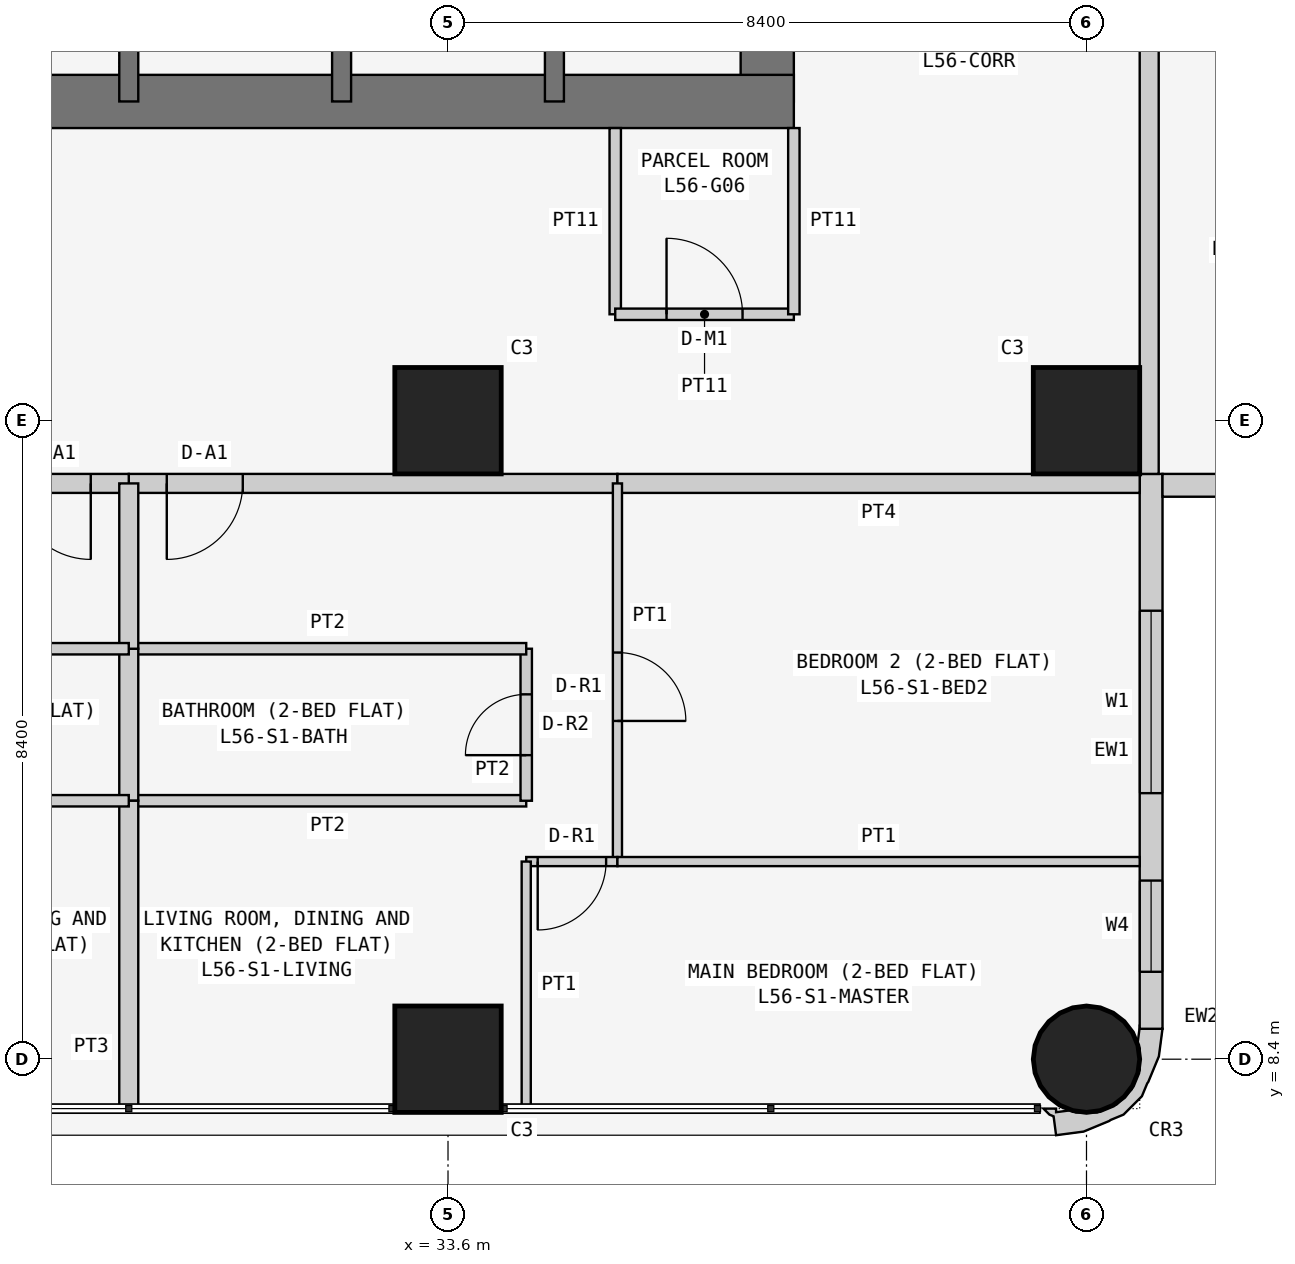
"""IFC4 building model, lengths in metres.
Left out: names, types, materials, properties, quantities, classifications, styles, units other than length and angle.
Written with IfcOpenShell. Run it as: python <this file> out.ifc"""

import sys

from ifc_helpers import new_model, si_unit, direction, frame, frame_2d, origin, origin_2d, place, context, subcontext, project, spatial, polyline, rectangle, circle, outline, extrude, element, fill, save


model = new_model("IFC4")
c1 = context("Model", 3, precision=1e-05, world=origin(), true_north=direction((0.0, 1.0)))
c2 = subcontext(c1, "Body", "Model", "MODEL_VIEW")
j1 = project(units=[si_unit("LENGTHUNIT", "METRE"), si_unit("PLANEANGLEUNIT", "RADIAN")], contexts=[c1])
p1 = place(None, origin())
s1 = spatial("IfcSite", under=j1, at=p1, CompositionType="ELEMENT")
p2 = place(p1, origin())
s2 = spatial("IfcBuilding", under=s1, at=p2, CompositionType="ELEMENT")
p3 = place(p2, frame((0.0, 0.0, 215.7)))
s3 = spatial("IfcBuildingStorey", under=s2, at=p3, CompositionType="ELEMENT", Elevation=215.7)
for number, where, z_axis, x_axis in (
    (1, (33.6, 8.4, 0.0), (0.0, 0.0, 1.0), (1.0, 0.0, 0.0)),
    (2, (33.6, 16.8, 0.0), (0.0, 0.0, 1.0), (1.0, 0.0, 0.0)),
):
    element("IfcColumn", number, at=place(p3, frame(where, z_axis=z_axis, x_axis=x_axis)), inside=s3, PredefinedType="COLUMN", context=c2, shape_type="SweptSolid", body=[
        extrude(rectangle(XDim=1.4, YDim=1.4, at=origin_2d()), origin(), (0.0, 0.0, 1.0), 3.6),
    ])
p4 = place(p3, frame((42.0, 8.4, 0.0), z_axis=(0.0, 0.0, 1.0), x_axis=(1.0, 0.0, 0.0)))
e3 = element("IfcColumn", 3, at=p4, inside=s3, PredefinedType="COLUMN", context=c2, shape_type="SweptSolid", body=[
    extrude(circle(Radius=0.7, at=origin_2d()), origin(), (0.0, 0.0, 1.0), 3.6),
])
p5 = place(p3, frame((42.0, 16.8, 0.0), z_axis=(0.0, 0.0, 1.0), x_axis=(1.0, 0.0, 0.0)))
e4 = element("IfcColumn", 4, at=p5, inside=s3, PredefinedType="COLUMN", context=c2, shape_type="SweptSolid", body=[
    extrude(rectangle(XDim=1.4, YDim=1.4, at=origin_2d()), origin(), (0.0, 0.0, 1.0), 3.6),
])
p6 = place(p3, frame((21.0, 21.0, 0.0), z_axis=(0.0, 0.0, 1.0), x_axis=(1.0, 0.0, 0.0)))
e5 = element("IfcWall", 5, at=p6, inside=s3, PredefinedType="SHEAR", context=c2, shape_type="SweptSolid", body=[
    extrude(rectangle(XDim=17.15, YDim=0.7, at=frame_2d((8.575, 0.0))), origin(), (0.0, 0.0, 1.0), 3.6),
])
p7 = place(p3, frame((37.8, 21.0, 0.0), z_axis=(0.0, 0.0, 1.0), x_axis=(0.0, 1.0, 0.0)))
e6 = element("IfcWall", 6, at=p7, inside=s3, PredefinedType="SHEAR", context=c2, shape_type="SweptSolid", body=[
    extrude(rectangle(XDim=17.15, YDim=0.7, at=frame_2d((8.575, 0.0))), origin(), (0.0, 0.0, 1.0), 3.6),
])
p8 = place(p7, frame((5.2, 0.0, 0.0)))
e7 = element("IfcOpeningElement", 7, at=p8, cuts=e6, PredefinedType="OPENING", context=c2, shape_type="SweptSolid", body=[
    extrude(rectangle(XDim=1.2, YDim=2.1, at=frame_2d((0.6, 1.05))), frame((0.0, 0.36, 0.0), z_axis=(0.0, -1.0, 0.0), x_axis=(1.0, 0.0, 0.0)), (0.0, 0.0, 1.0), 0.72),
])
for number, where, z_axis, x_axis in (
    (8, (29.4, 21.0, 0.0), (0.0, 0.0, 1.0), (0.0, 1.0, 0.0)),
    (9, (32.2, 21.0, 0.0), (0.0, 0.0, 1.0), (0.0, 1.0, 0.0)),
    (10, (35.0, 21.0, 0.0), (0.0, 0.0, 1.0), (0.0, 1.0, 0.0)),
):
    element("IfcWall", number, at=place(p3, frame(where, z_axis=z_axis, x_axis=x_axis)), inside=s3, PredefinedType="SHEAR", context=c2, shape_type="SweptSolid", body=[
        extrude(rectangle(XDim=3.2, YDim=0.25, at=frame_2d((1.6, 0.0))), origin(), (0.0, 0.0, 1.0), 3.6),
    ])
p9 = place(p3, frame((42.85, 8.8, 0.0), z_axis=(0.0, 0.0, 1.0), x_axis=(0.0, 1.0, 0.0)))
e11 = element("IfcWall", 11, at=p9, inside=s3, PredefinedType="SOLIDWALL", context=c2, shape_type="SweptSolid", body=[
    extrude(rectangle(XDim=7.3, YDim=0.3, at=frame_2d((3.65, 0.0))), origin(), (0.0, 0.0, 1.0), 3.45),
])
p10 = place(p9, frame((3.1, 0.0, 0.9)))
e12 = element("IfcOpeningElement", 12, at=p10, cuts=e11, PredefinedType="OPENING", context=c2, shape_type="SweptSolid", body=[
    extrude(rectangle(XDim=2.4, YDim=1.5, at=frame_2d((1.2, 0.75))), frame((0.0, 0.16, 0.0), z_axis=(0.0, -1.0, 0.0), x_axis=(1.0, 0.0, 0.0)), (0.0, 0.0, 1.0), 0.32),
])
p11 = place(p9, frame((0.75, 0.0, 0.9)))
e13 = element("IfcOpeningElement", 13, at=p11, cuts=e11, PredefinedType="OPENING", context=c2, shape_type="SweptSolid", body=[
    extrude(rectangle(XDim=1.2, YDim=1.5, at=frame_2d((0.6, 0.75))), frame((0.0, 0.16, 0.0), z_axis=(0.0, -1.0, 0.0), x_axis=(1.0, 0.0, 0.0)), (0.0, 0.0, 1.0), 0.32),
])
p12 = place(p3, frame((43.0, 15.95, 0.0), z_axis=(0.0, 0.0, 1.0), x_axis=(1.0, 0.0, 0.0)))
e14 = element("IfcWall", 14, at=p12, inside=s3, PredefinedType="SOLIDWALL", context=c2, shape_type="SweptSolid", body=[
    extrude(rectangle(XDim=7.0, YDim=0.3, at=frame_2d((3.5, 0.0))), origin(), (0.0, 0.0, 1.0), 3.45),
])
p13 = place(p12, frame((1.5, 0.0, 0.9)))
e15 = element("IfcOpeningElement", 15, at=p13, cuts=e14, PredefinedType="OPENING", context=c2, shape_type="SweptSolid", body=[
    extrude(rectangle(XDim=2.4, YDim=1.5, at=frame_2d((1.2, 0.75))), frame((0.0, 0.16, 0.0), z_axis=(0.0, -1.0, 0.0), x_axis=(1.0, 0.0, 0.0)), (0.0, 0.0, 1.0), 0.32),
])
p14 = place(p12, frame((5.05, 0.0, 0.9)))
e16 = element("IfcOpeningElement", 16, at=p14, cuts=e14, PredefinedType="OPENING", context=c2, shape_type="SweptSolid", body=[
    extrude(rectangle(XDim=1.2, YDim=1.5, at=frame_2d((0.6, 0.75))), frame((0.0, 0.16, 0.0), z_axis=(0.0, -1.0, 0.0), x_axis=(1.0, 0.0, 0.0)), (0.0, 0.0, 1.0), 0.32),
])
p15 = place(p3, frame((41.488, 7.812, 0.0), z_axis=(0.0, 0.0, 1.0), x_axis=(0.439933741929, -0.898030234854, 0.0)))
e17 = element("IfcWall", 17, at=p15, inside=s3, PredefinedType="SOLIDWALL", context=c2, shape_type="SweptSolid", body=[
    extrude(outline(polyline([(-0.222, 1.793), (-0.39, 1.541), (-0.372, 1.532), (-0.195, 1.414), (-0.12, 1.41), (0.131, 1.287), (0.315, 1.078), (0.406, 0.814), (0.388, 0.536), (0.265, 0.285), (0.209, 0.235), (0.148, 0.053), (0.105, 0.074), (0.032, -0.076), (0.138, -0.04), (0.182, -0.0), (0.419, -0.08), (0.536, 0.266), (0.559, 0.631), (0.555, 0.651), (0.566, 0.836), (0.455, 1.159), (0.333, 1.298), (0.324, 1.317), (0.082, 1.591), (-0.222, 1.793)])), origin(), (0.0, 0.0, 1.0), 3.45),
])
p16 = place(p3, frame((35.8, 20.65, 0.0), z_axis=(0.0, 0.0, 1.0), x_axis=(0.0, -1.0, 0.0)))
e18 = element("IfcWall", 18, at=p16, inside=s3, PredefinedType="PARTITIONING", context=c2, shape_type="SweptSolid", body=[
    extrude(rectangle(XDim=2.45, YDim=0.15, at=frame_2d((1.225, 0.0))), origin(), (0.0, 0.0, 1.0), 3.45),
])
p17 = place(p3, frame((35.8, 18.2, 0.0), z_axis=(0.0, 0.0, 1.0), x_axis=(1.0, 0.0, 0.0)))
e19 = element("IfcWall", 19, at=p17, inside=s3, PredefinedType="PARTITIONING", context=c2, shape_type="SweptSolid", body=[
    extrude(rectangle(XDim=2.35, YDim=0.15, at=frame_2d((1.175, 0.0))), origin(), (0.0, 0.0, 1.0), 3.45),
])
p18 = place(p17, frame((0.675, 0.0, 0.0)))
e20 = element("IfcOpeningElement", 20, at=p18, cuts=e19, PredefinedType="OPENING", context=c2, shape_type="SweptSolid", body=[
    extrude(rectangle(XDim=1.0, YDim=2.1, at=frame_2d((0.5, 1.05))), frame((0.0, 0.085, 0.0), z_axis=(0.0, -1.0, 0.0), x_axis=(1.0, 0.0, 0.0)), (0.0, 0.0, 1.0), 0.17),
])
p19 = place(p3, frame((38.15, 18.2, 0.0), z_axis=(0.0, 0.0, 1.0), x_axis=(0.0, 1.0, 0.0)))
e21 = element("IfcWall", 21, at=p19, inside=s3, PredefinedType="PARTITIONING", context=c2, shape_type="SweptSolid", body=[
    extrude(rectangle(XDim=2.45, YDim=0.15, at=frame_2d((1.225, 0.0))), origin(), (0.0, 0.0, 1.0), 3.45),
])
p20 = place(p3, frame((42.825, 22.971, 0.0), z_axis=(0.0, 0.0, 1.0), x_axis=(0.0, -1.0, 0.0)))
e22 = element("IfcWall", 22, at=p20, inside=s3, PredefinedType="PARTITIONING", context=c2, shape_type="SweptSolid", body=[
    extrude(rectangle(XDim=6.871, YDim=0.25, at=frame_2d((3.436, 0.0))), origin(), (0.0, 0.0, 1.0), 3.45),
])
p21 = place(p3, frame((35.829, 15.975, 0.0), z_axis=(0.0, 0.0, 1.0), x_axis=(-1.0, 0.0, 0.0)))
e23 = element("IfcWall", 23, at=p21, inside=s3, PredefinedType="PARTITIONING", context=c2, shape_type="SweptSolid", body=[
    extrude(rectangle(XDim=6.429, YDim=0.25, at=frame_2d((3.215, 0.0))), origin(), (0.0, 0.0, 1.0), 3.45),
])
p22 = place(p21, frame((4.929, 0.0, 0.0)))
e24 = element("IfcOpeningElement", 24, at=p22, cuts=e23, PredefinedType="OPENING", context=c2, shape_type="SweptSolid", body=[
    extrude(rectangle(XDim=1.0, YDim=2.1, at=frame_2d((0.5, 1.05))), frame((0.0, 0.135, 0.0), z_axis=(0.0, -1.0, 0.0), x_axis=(1.0, 0.0, 0.0)), (0.0, 0.0, 1.0), 0.27),
])
p23 = place(p3, frame((42.7, 15.975, 0.0), z_axis=(0.0, 0.0, 1.0), x_axis=(-1.0, 0.0, 0.0)))
e25 = element("IfcWall", 25, at=p23, inside=s3, PredefinedType="PARTITIONING", context=c2, shape_type="SweptSolid", body=[
    extrude(rectangle(XDim=6.871, YDim=0.25, at=frame_2d((3.436, 0.0))), origin(), (0.0, 0.0, 1.0), 3.45),
])
p24 = place(p3, frame((29.4, 15.975, 0.0), z_axis=(0.0, 0.0, 1.0), x_axis=(-1.0, 0.0, 0.0)))
e26 = element("IfcWall", 26, at=p24, inside=s3, PredefinedType="PARTITIONING", context=c2, shape_type="SweptSolid", body=[
    extrude(rectangle(XDim=6.429, YDim=0.25, at=frame_2d((3.214, 0.0))), origin(), (0.0, 0.0, 1.0), 3.45),
])
p25 = place(p24, frame((0.5, 0.0, 0.0)))
e27 = element("IfcOpeningElement", 27, at=p25, cuts=e26, PredefinedType="OPENING", context=c2, shape_type="SweptSolid", body=[
    extrude(rectangle(XDim=1.0, YDim=2.1, at=frame_2d((0.5, 1.05))), frame((0.0, 0.135, 0.0), z_axis=(0.0, -1.0, 0.0), x_axis=(1.0, 0.0, 0.0)), (0.0, 0.0, 1.0), 0.27),
])
p26 = place(p3, frame((29.4, 11.8, 0.0), z_axis=(0.0, 0.0, 1.0), x_axis=(1.0, 0.0, 0.0)))
e28 = element("IfcWall", 28, at=p26, inside=s3, PredefinedType="PARTITIONING", context=c2, shape_type="SweptSolid", body=[
    extrude(rectangle(XDim=5.229, YDim=0.15, at=frame_2d((2.615, 0.0))), origin(), (0.0, 0.0, 1.0), 3.45),
])
p27 = place(p3, frame((34.629, 11.8, 0.0), z_axis=(0.0, 0.0, 1.0), x_axis=(0.0, 1.0, 0.0)))
e29 = element("IfcWall", 29, at=p27, inside=s3, PredefinedType="PARTITIONING", context=c2, shape_type="SweptSolid", body=[
    extrude(rectangle(XDim=2.0, YDim=0.15, at=frame_2d((1.0, 0.0))), origin(), (0.0, 0.0, 1.0), 3.45),
])
p28 = place(p27, frame((0.6, 0.0, 0.0)))
e30 = element("IfcOpeningElement", 30, at=p28, cuts=e29, PredefinedType="OPENING", context=c2, shape_type="SweptSolid", body=[
    extrude(rectangle(XDim=0.8, YDim=2.1, at=frame_2d((0.4, 1.05))), frame((0.0, 0.085, 0.0), z_axis=(0.0, -1.0, 0.0), x_axis=(1.0, 0.0, 0.0)), (0.0, 0.0, 1.0), 0.17),
])
p29 = place(p3, frame((34.629, 13.8, 0.0), z_axis=(0.0, 0.0, 1.0), x_axis=(-1.0, 0.0, 0.0)))
e31 = element("IfcWall", 31, at=p29, inside=s3, PredefinedType="PARTITIONING", context=c2, shape_type="SweptSolid", body=[
    extrude(rectangle(XDim=5.229, YDim=0.15, at=frame_2d((2.615, 0.0))), origin(), (0.0, 0.0, 1.0), 3.45),
])
p30 = place(p3, frame((29.4, 13.8, 0.0), z_axis=(0.0, 0.0, 1.0), x_axis=(0.0, -1.0, 0.0)))
e32 = element("IfcWall", 32, at=p30, inside=s3, PredefinedType="PARTITIONING", context=c2, shape_type="SweptSolid", body=[
    extrude(rectangle(XDim=2.0, YDim=0.25, at=frame_2d((1.0, 0.0))), origin(), (0.0, 0.0, 1.0), 2.848),
])
p31 = place(p3, frame((35.829, 15.975, 0.0), z_axis=(0.0, 0.0, 1.0), x_axis=(0.0, -1.0, 0.0)))
e33 = element("IfcWall", 33, at=p31, inside=s3, PredefinedType="PARTITIONING", context=c2, shape_type="SweptSolid", body=[
    extrude(rectangle(XDim=4.975, YDim=0.12, at=frame_2d((2.488, 0.0))), origin(), (0.0, 0.0, 1.0), 3.45),
])
p32 = place(p31, frame((2.225, 0.0, 0.0)))
e34 = element("IfcOpeningElement", 34, at=p32, cuts=e33, PredefinedType="OPENING", context=c2, shape_type="SweptSolid", body=[
    extrude(rectangle(XDim=0.9, YDim=2.1, at=frame_2d((0.45, 1.05))), frame((0.0, 0.07, 0.0), z_axis=(0.0, -1.0, 0.0), x_axis=(1.0, 0.0, 0.0)), (0.0, 0.0, 1.0), 0.14),
])
p33 = place(p3, frame((35.829, 11.0, 0.0), z_axis=(0.0, 0.0, 1.0), x_axis=(-1.0, 0.0, 0.0)))
e35 = element("IfcWall", 35, at=p33, inside=s3, PredefinedType="PARTITIONING", context=c2, shape_type="SweptSolid", body=[
    extrude(rectangle(XDim=1.2, YDim=0.12, at=frame_2d((0.6, 0.0))), origin(), (0.0, 0.0, 1.0), 3.45),
])
p34 = place(p33, frame((0.149, 0.0, 0.0)))
e36 = element("IfcOpeningElement", 36, at=p34, cuts=e35, PredefinedType="OPENING", context=c2, shape_type="SweptSolid", body=[
    extrude(rectangle(XDim=0.9, YDim=2.1, at=frame_2d((0.45, 1.05))), frame((0.0, 0.07, 0.0), z_axis=(0.0, -1.0, 0.0), x_axis=(1.0, 0.0, 0.0)), (0.0, 0.0, 1.0), 0.14),
])
p35 = place(p3, frame((34.629, 11.0, 0.0), z_axis=(0.0, 0.0, 1.0), x_axis=(0.0, -1.0, 0.0)))
e37 = element("IfcWall", 37, at=p35, inside=s3, PredefinedType="PARTITIONING", context=c2, shape_type="SweptSolid", body=[
    extrude(rectangle(XDim=3.25, YDim=0.12, at=frame_2d((1.625, 0.0))), origin(), (0.0, 0.0, 1.0), 3.45),
])
p36 = place(p3, frame((29.4, 7.75, 0.0), z_axis=(0.0, 0.0, 1.0), x_axis=(0.0, 1.0, 0.0)))
e38 = element("IfcWall", 38, at=p36, inside=s3, PredefinedType="PARTITIONING", context=c2, shape_type="SweptSolid", body=[
    extrude(rectangle(XDim=4.05, YDim=0.25, at=frame_2d((2.025, 0.0))), origin(), (0.0, 0.0, 1.0), 2.848),
])
p37 = place(p3, frame((29.4, 13.8, 0.0), z_axis=(0.0, 0.0, 1.0), x_axis=(0.0, 1.0, 0.0)))
e39 = element("IfcWall", 39, at=p37, inside=s3, PredefinedType="PARTITIONING", context=c2, shape_type="SweptSolid", body=[
    extrude(rectangle(XDim=2.175, YDim=0.25, at=frame_2d((1.087, 0.0))), origin(), (0.0, 0.0, 1.0), 2.848),
])
p38 = place(p3, frame((35.829, 11.0, 0.0), z_axis=(0.0, 0.0, 1.0), x_axis=(1.0, 0.0, 0.0)))
e40 = element("IfcWall", 40, at=p38, inside=s3, PredefinedType="PARTITIONING", context=c2, shape_type="SweptSolid", body=[
    extrude(rectangle(XDim=6.871, YDim=0.12, at=frame_2d((3.436, 0.0))), origin(), (0.0, 0.0, 1.0), 3.45),
])
for number, where, z_axis, x_axis in (
    (41, (29.4, 11.8, 0.0), (0.0, 0.0, 1.0), (-1.0, 0.0, 0.0)),
    (42, (24.171, 13.8, 0.0), (0.0, 0.0, 1.0), (1.0, 0.0, 0.0)),
):
    element("IfcWall", number, at=place(p3, frame(where, z_axis=z_axis, x_axis=x_axis)), inside=s3, PredefinedType="PARTITIONING", context=c2, shape_type="SweptSolid", body=[
        extrude(rectangle(XDim=5.229, YDim=0.15, at=frame_2d((2.615, 0.0))), origin(), (0.0, 0.0, 1.0), 3.45),
    ])
p39 = place(p10, origin())
e43 = element("IfcWindow", 43, at=p39, inside=s3, PartitioningType="SINGLE_PANEL", PredefinedType="WINDOW", context=c2, shape_type="SweptSolid", body=[
    extrude(rectangle(XDim=2.4, YDim=1.5, at=frame_2d((1.2, 0.75))), frame((0.0, 0.03, 0.0), z_axis=(0.0, -1.0, 0.0), x_axis=(1.0, 0.0, 0.0)), (0.0, 0.0, 1.0), 0.06),
])
fill(e12, e43)
p40 = place(p11, origin())
e44 = element("IfcWindow", 44, at=p40, inside=s3, PartitioningType="SINGLE_PANEL", PredefinedType="WINDOW", context=c2, shape_type="SweptSolid", body=[
    extrude(rectangle(XDim=1.2, YDim=1.5, at=frame_2d((0.6, 0.75))), frame((0.0, 0.03, 0.0), z_axis=(0.0, -1.0, 0.0), x_axis=(1.0, 0.0, 0.0)), (0.0, 0.0, 1.0), 0.06),
])
fill(e13, e44)
p41 = place(p18, origin())
e45 = element("IfcDoor", 45, at=p41, inside=s3, OperationType="SINGLE_SWING_LEFT", PredefinedType="DOOR", context=c2, shape_type="SweptSolid", body=[
    extrude(rectangle(XDim=1.0, YDim=2.1, at=frame_2d((0.5, 1.05))), frame((0.0, 0.025, 0.0), z_axis=(0.0, -1.0, 0.0), x_axis=(1.0, 0.0, 0.0)), (0.0, 0.0, 1.0), 0.05),
])
fill(e20, e45)
p42 = place(p22, origin())
e46 = element("IfcDoor", 46, at=p42, inside=s3, OperationType="SINGLE_SWING_RIGHT", PredefinedType="DOOR", context=c2, shape_type="SweptSolid", body=[
    extrude(rectangle(XDim=1.0, YDim=2.1, at=frame_2d((0.5, 1.05))), frame((0.0, 0.025, 0.0), z_axis=(0.0, -1.0, 0.0), x_axis=(1.0, 0.0, 0.0)), (0.0, 0.0, 1.0), 0.05),
])
fill(e24, e46)
p43 = place(p28, origin())
e47 = element("IfcDoor", 47, at=p43, inside=s3, OperationType="SINGLE_SWING_LEFT", PredefinedType="DOOR", context=c2, shape_type="SweptSolid", body=[
    extrude(rectangle(XDim=0.8, YDim=2.1, at=frame_2d((0.4, 1.05))), frame((0.0, 0.025, 0.0), z_axis=(0.0, -1.0, 0.0), x_axis=(1.0, 0.0, 0.0)), (0.0, 0.0, 1.0), 0.05),
])
fill(e30, e47)
p44 = place(p32, origin())
e48 = element("IfcDoor", 48, at=p44, inside=s3, OperationType="SINGLE_SWING_RIGHT", PredefinedType="DOOR", context=c2, shape_type="SweptSolid", body=[
    extrude(rectangle(XDim=0.9, YDim=2.1, at=frame_2d((0.45, 1.05))), frame((0.0, 0.025, 0.0), z_axis=(0.0, -1.0, 0.0), x_axis=(1.0, 0.0, 0.0)), (0.0, 0.0, 1.0), 0.05),
])
fill(e34, e48)
p45 = place(p34, origin())
e49 = element("IfcDoor", 49, at=p45, inside=s3, OperationType="SINGLE_SWING_RIGHT", PredefinedType="DOOR", context=c2, shape_type="SweptSolid", body=[
    extrude(rectangle(XDim=0.9, YDim=2.1, at=frame_2d((0.45, 1.05))), frame((0.0, 0.025, 0.0), z_axis=(0.0, -1.0, 0.0), x_axis=(1.0, 0.0, 0.0)), (0.0, 0.0, 1.0), 0.05),
])
fill(e36, e49)
p46 = place(p25, origin())
e50 = element("IfcDoor", 50, at=p46, inside=s3, OperationType="SINGLE_SWING_LEFT", PredefinedType="DOOR", context=c2, shape_type="SweptSolid", body=[
    extrude(rectangle(XDim=1.0, YDim=2.1, at=frame_2d((0.5, 1.05))), frame((0.0, 0.025, 0.0), z_axis=(0.0, -1.0, 0.0), x_axis=(1.0, 0.0, 0.0)), (0.0, 0.0, 1.0), 0.05),
])
fill(e27, e50)
save(model, sys.argv[1])
